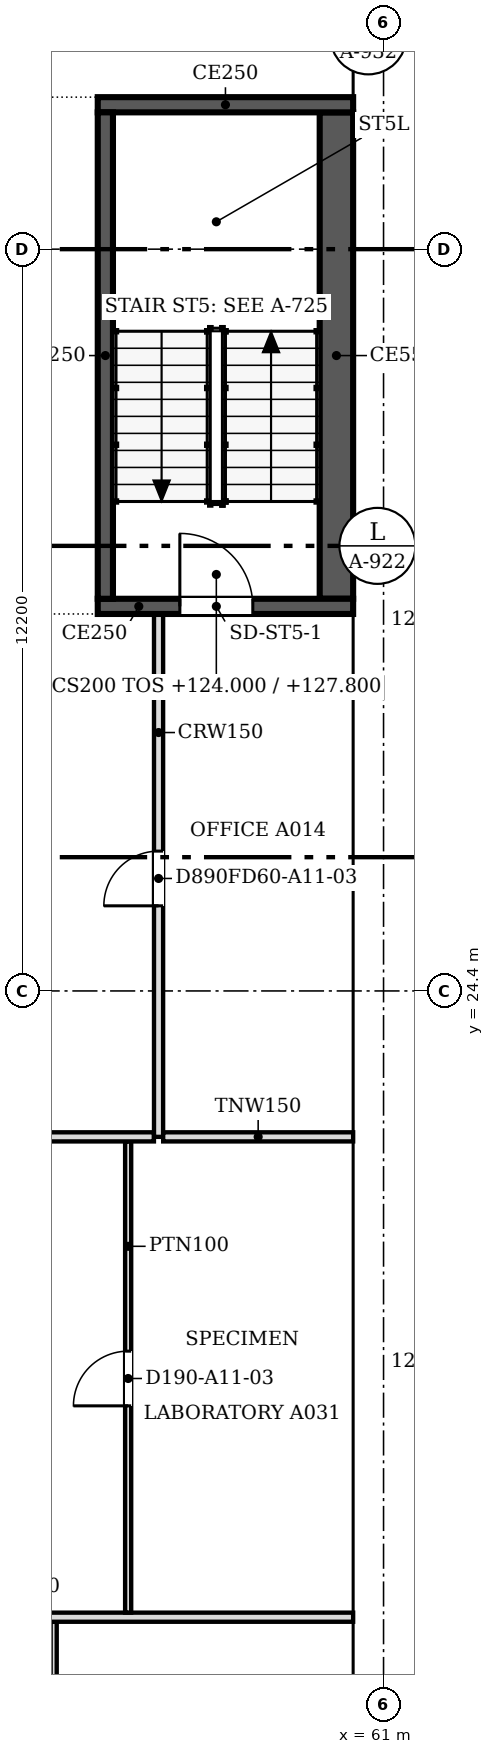
"""IFC4 building model, lengths in metres.
Left out: names, types, materials, properties, quantities, classifications, styles, units other than length and angle.
Written with IfcOpenShell. Run it as: python <this file> out.ifc"""

import sys

from ifc_helpers import new_model, si_unit, direction, frame, frame_2d, origin, place, context, subcontext, project, spatial, polyline, rectangle, outline, extrude, faceted_brep, source, transform, mapped, element, fill, save


model = new_model("IFC4")
c1 = context("Model", 3, precision=1e-05, world=origin(), true_north=direction((0.0, 1.0)))
c2 = subcontext(c1, "Body", "Model", "MODEL_VIEW")
j1 = project(units=[si_unit("LENGTHUNIT", "METRE"), si_unit("PLANEANGLEUNIT", "RADIAN")], contexts=[c1])
p1 = place(None, origin())
s1 = spatial("IfcSite", under=j1, at=p1, CompositionType="ELEMENT")
p2 = place(p1, origin())
s2 = spatial("IfcBuilding", under=s1, at=p2, CompositionType="ELEMENT")
p3 = place(p2, frame((0.0, 0.0, 124.0)))
s3 = spatial("IfcBuildingStorey", under=s2, at=p3, CompositionType="ELEMENT", Elevation=124.0)
m1 = source(origin(), c2, "Body", "SweptSolid", [
    extrude(outline(polyline([(3.05, 0.0), (6.1, 3.8), (3.05, 7.6), (0.0, 3.8), (3.05, 0.0)])), frame((0.0, 0.25, 0.0), z_axis=(0.0, -1.0, 0.0), x_axis=(1.0, 0.0, 0.0)), (0.0, 0.0, 1.0), 0.5),
])
p4 = place(p3, frame((60.75, 9.15, -3.8), z_axis=(0.0, 0.0, 1.0), x_axis=(0.0, 1.0, 0.0)))
e1 = element("IfcWall", 1, at=p4, inside=s3, PredefinedType="SOLIDWALL", context=c2, shape_type="MappedRepresentation", body=[
    mapped(m1, transform((0.0, 0.0, 0.0), scale=1.0)),
])
m2 = source(origin(), c2, "Body", "SweptSolid", [
    extrude(outline(polyline([(3.05, 0.399), (5.78, 3.8), (3.05, 7.201), (0.321, 3.8), (3.05, 0.399)])), frame((0.0, 0.26, 0.0), z_axis=(0.0, -1.0, 0.0), x_axis=(1.0, 0.0, 0.0)), (0.0, 0.0, 1.0), 0.52),
])
p5 = place(p4, origin())
e2 = element("IfcOpeningElement", 2, at=p5, cuts=e1, PredefinedType="OPENING", context=c2, shape_type="MappedRepresentation", body=[
    mapped(m2, transform((0.0, 0.0, 0.0), scale=1.0)),
])
p6 = place(p3, frame((60.75, 15.25, -3.8), z_axis=(0.0, 0.0, 1.0), x_axis=(0.0, 1.0, 0.0)))
e3 = element("IfcWall", 3, at=p6, inside=s3, PredefinedType="SOLIDWALL", context=c2, shape_type="MappedRepresentation", body=[
    mapped(m1, transform((0.0, 0.0, 0.0), scale=1.0)),
])
p7 = place(p6, origin())
e4 = element("IfcOpeningElement", 4, at=p7, cuts=e3, PredefinedType="OPENING", context=c2, shape_type="MappedRepresentation", body=[
    mapped(m2, transform((0.0, 0.0, 0.0), scale=1.0)),
])
m3 = source(origin(), c2, "Body", "Brep", [
    faceted_brep([(3.05, -0.25, 0.0), (6.1, -0.25, 3.8), (6.1, -0.25, 3.8), (3.05, -0.25, 7.6), (0.0, -0.25, 3.8), (0.0, 0.25, 3.8), (3.05, 0.25, 7.6), (6.1, 0.25, 3.8), (6.1, 0.25, 3.8), (3.05, 0.25, 0.0)], [[[0, 1, 2, 3, 4]], [[5, 6, 7, 8, 9]], [[9, 8, 1, 0]], [[7, 6, 3, 2]], [[6, 5, 4, 3]], [[5, 9, 0, 4]], [[1, 8, 7, 2]]]),
])
p8 = place(p3, frame((60.75, 21.35, -3.8), z_axis=(0.0, 0.0, 1.0), x_axis=(0.0, 1.0, 0.0)))
e5 = element("IfcWall", 5, at=p8, inside=s3, PredefinedType="SOLIDWALL", context=c2, shape_type="MappedRepresentation", body=[
    mapped(m3, transform((0.0, 0.0, 0.0), scale=1.0)),
])
p9 = place(p8, origin())
e6 = element("IfcOpeningElement", 6, at=p9, cuts=e5, PredefinedType="OPENING", context=c2, shape_type="MappedRepresentation", body=[
    mapped(m2, transform((0.0, 0.0, 0.0), scale=1.0)),
])
p10 = place(p3, frame((60.75, 27.45, -3.8), z_axis=(0.0, 0.0, 1.0), x_axis=(0.0, 1.0, 0.0)))
e7 = element("IfcWall", 7, at=p10, inside=s3, PredefinedType="SOLIDWALL", context=c2, shape_type="MappedRepresentation", body=[
    mapped(m1, transform((0.0, 0.0, 0.0), scale=1.0)),
])
p11 = place(p10, origin())
e8 = element("IfcOpeningElement", 8, at=p11, cuts=e7, PredefinedType="OPENING", context=c2, shape_type="MappedRepresentation", body=[
    mapped(m2, transform((0.0, 0.0, 0.0), scale=1.0)),
])
p12 = place(p3, frame((60.75, 33.55, -3.8), z_axis=(0.0, 0.0, 1.0), x_axis=(0.0, 1.0, 0.0)))
e9 = element("IfcWall", 9, at=p12, inside=s3, PredefinedType="SOLIDWALL", context=c2, shape_type="MappedRepresentation", body=[
    mapped(m3, transform((0.0, 0.0, 0.0), scale=1.0)),
])
p13 = place(p12, origin())
e10 = element("IfcOpeningElement", 10, at=p13, cuts=e9, PredefinedType="OPENING", context=c2, shape_type="MappedRepresentation", body=[
    mapped(m2, transform((0.0, 0.0, 0.0), scale=1.0)),
])
p14 = place(p3, frame((60.75, 39.65, -3.8), z_axis=(0.0, 0.0, 1.0), x_axis=(0.0, 1.0, 0.0)))
e11 = element("IfcWall", 11, at=p14, inside=s3, PredefinedType="SOLIDWALL", context=c2, shape_type="MappedRepresentation", body=[
    mapped(m1, transform((0.0, 0.0, 0.0), scale=1.0)),
])
p15 = place(p14, origin())
e12 = element("IfcOpeningElement", 12, at=p15, cuts=e11, PredefinedType="OPENING", context=c2, shape_type="MappedRepresentation", body=[
    mapped(m2, transform((0.0, 0.0, 0.0), scale=1.0)),
])
p16 = place(p2, frame((0.0, 0.0, 127.8)))
s4 = spatial("IfcBuildingStorey", under=s2, at=p16, CompositionType="ELEMENT", Elevation=127.8)
p17 = place(p16, frame((60.75, 12.2, -3.8), z_axis=(0.0, 0.0, 1.0), x_axis=(0.0, 1.0, 0.0)))
e13 = element("IfcWall", 13, at=p17, inside=s4, PredefinedType="SOLIDWALL", context=c2, shape_type="MappedRepresentation", body=[
    mapped(m1, transform((0.0, 0.0, 0.0), scale=1.0)),
])
p18 = place(p17, origin())
e14 = element("IfcOpeningElement", 14, at=p18, cuts=e13, PredefinedType="OPENING", context=c2, shape_type="MappedRepresentation", body=[
    mapped(m2, transform((0.0, 0.0, 0.0), scale=1.0)),
])
p19 = place(p16, frame((60.75, 18.3, -3.8), z_axis=(0.0, 0.0, 1.0), x_axis=(0.0, 1.0, 0.0)))
e15 = element("IfcWall", 15, at=p19, inside=s4, PredefinedType="SOLIDWALL", context=c2, shape_type="MappedRepresentation", body=[
    mapped(m3, transform((0.0, 0.0, 0.0), scale=1.0)),
])
p20 = place(p19, origin())
e16 = element("IfcOpeningElement", 16, at=p20, cuts=e15, PredefinedType="OPENING", context=c2, shape_type="MappedRepresentation", body=[
    mapped(m2, transform((0.0, 0.0, 0.0), scale=1.0)),
])
p21 = place(p16, frame((60.75, 24.4, -3.8), z_axis=(0.0, 0.0, 1.0), x_axis=(0.0, 1.0, 0.0)))
e17 = element("IfcWall", 17, at=p21, inside=s4, PredefinedType="SOLIDWALL", context=c2, shape_type="MappedRepresentation", body=[
    mapped(m1, transform((0.0, 0.0, 0.0), scale=1.0)),
])
p22 = place(p21, origin())
e18 = element("IfcOpeningElement", 18, at=p22, cuts=e17, PredefinedType="OPENING", context=c2, shape_type="MappedRepresentation", body=[
    mapped(m2, transform((0.0, 0.0, 0.0), scale=1.0)),
])
p23 = place(p16, frame((60.75, 30.5, -3.8), z_axis=(0.0, 0.0, 1.0), x_axis=(0.0, 1.0, 0.0)))
e19 = element("IfcWall", 19, at=p23, inside=s4, PredefinedType="SOLIDWALL", context=c2, shape_type="MappedRepresentation", body=[
    mapped(m1, transform((0.0, 0.0, 0.0), scale=1.0)),
])
p24 = place(p23, origin())
e20 = element("IfcOpeningElement", 20, at=p24, cuts=e19, PredefinedType="OPENING", context=c2, shape_type="MappedRepresentation", body=[
    mapped(m2, transform((0.0, 0.0, 0.0), scale=1.0)),
])
p25 = place(p16, frame((60.75, 36.6, -3.8), z_axis=(0.0, 0.0, 1.0), x_axis=(0.0, 1.0, 0.0)))
e21 = element("IfcWall", 21, at=p25, inside=s4, PredefinedType="SOLIDWALL", context=c2, shape_type="MappedRepresentation", body=[
    mapped(m3, transform((0.0, 0.0, 0.0), scale=1.0)),
])
p26 = place(p25, origin())
e22 = element("IfcOpeningElement", 22, at=p26, cuts=e21, PredefinedType="OPENING", context=c2, shape_type="MappedRepresentation", body=[
    mapped(m2, transform((0.0, 0.0, 0.0), scale=1.0)),
])
p27 = place(p3, frame((60.5, 30.725, 0.0), z_axis=(0.0, 0.0, 1.0), x_axis=(-1.0, 0.0, 0.0)))
e23 = element("IfcWall", 23, at=p27, inside=s3, PredefinedType="SOLIDWALL", context=c2, shape_type="SweptSolid", body=[
    extrude(rectangle(XDim=4.2, YDim=0.25, at=frame_2d((2.1, 0.0))), origin(), (0.0, 0.0, 1.0), 3.8),
])
m4 = source(origin(), c2, "Body", "SweptSolid", [
    extrude(rectangle(XDim=1.2, YDim=2.1, at=frame_2d((0.6, 1.05))), frame((0.0, 0.135, 0.0), z_axis=(0.0, -1.0, 0.0), x_axis=(1.0, 0.0, 0.0)), (0.0, 0.0, 1.0), 0.27),
])
p28 = place(p27, frame((1.65, 0.0, 0.0)))
e24 = element("IfcOpeningElement", 24, at=p28, cuts=e23, PredefinedType="OPENING", context=c2, shape_type="MappedRepresentation", body=[
    mapped(m4, transform((0.0, 0.0, 0.0), scale=1.0)),
])
p29 = place(p3, frame((56.425, 30.85, 0.0), z_axis=(0.0, 0.0, 1.0), x_axis=(0.0, 1.0, 0.0)))
e25 = element("IfcWall", 25, at=p29, inside=s3, PredefinedType="SOLIDWALL", context=c2, shape_type="SweptSolid", body=[
    extrude(rectangle(XDim=8.0, YDim=0.25, at=frame_2d((4.0, 0.0))), origin(), (0.0, 0.0, 1.0), 3.8),
])
p30 = place(p3, frame((56.3, 38.975, 0.0), z_axis=(0.0, 0.0, 1.0), x_axis=(1.0, 0.0, 0.0)))
e26 = element("IfcWall", 26, at=p30, inside=s3, PredefinedType="SOLIDWALL", context=c2, shape_type="SweptSolid", body=[
    extrude(rectangle(XDim=4.2, YDim=0.25, at=frame_2d((2.1, 0.0))), origin(), (0.0, 0.0, 1.0), 3.8),
])
p31 = place(p3, frame((60.225, 38.85, 0.0), z_axis=(0.0, 0.0, 1.0), x_axis=(0.0, -1.0, 0.0)))
e27 = element("IfcWall", 27, at=p31, inside=s3, PredefinedType="SOLIDWALL", context=c2, shape_type="SweptSolid", body=[
    extrude(rectangle(XDim=8.0, YDim=0.55, at=frame_2d((4.0, 0.0))), origin(), (0.0, 0.0, 1.0), 3.8),
])
p32 = place(p3, frame((55.575, 14.024, 0.0), z_axis=(0.0, 0.0, 1.0), x_axis=(0.0, -1.0, 0.0)))
e28 = element("IfcWall", 28, at=p32, inside=s3, PredefinedType="PARTITIONING", context=c2, shape_type="SweptSolid", body=[
    extrude(rectangle(XDim=5.924, YDim=0.1, at=frame_2d((2.962, 0.0))), origin(), (0.0, 0.0, 1.0), 3.067),
])
m5 = source(origin(), c2, "Body", "SweptSolid", [
    extrude(rectangle(XDim=0.9, YDim=2.1, at=frame_2d((0.45, 1.05))), frame((0.0, 0.06, 0.0), z_axis=(0.0, -1.0, 0.0), x_axis=(1.0, 0.0, 0.0)), (0.0, 0.0, 1.0), 0.12),
])
p33 = place(p32, frame((2.524, 0.0, 0.0)))
e29 = element("IfcOpeningElement", 29, at=p33, cuts=e28, PredefinedType="OPENING", context=c2, shape_type="MappedRepresentation", body=[
    mapped(m5, transform((0.0, 0.0, 0.0), scale=1.0)),
])
p34 = place(p3, frame((49.426, 14.1, 0.0), z_axis=(0.0, 0.0, 1.0), x_axis=(1.0, 0.0, 0.0)))
e30 = element("IfcWall", 30, at=p34, inside=s3, PredefinedType="PARTITIONING", context=c2, shape_type="SweptSolid", body=[
    extrude(rectangle(XDim=11.074, YDim=0.15, at=frame_2d((5.537, 0.0))), origin(), (0.0, 0.0, 1.0), 3.067),
])
p35 = place(p3, frame((56.8, 21.924, 0.0), z_axis=(0.0, 0.0, 1.0), x_axis=(0.0, -1.0, 0.0)))
e31 = element("IfcWall", 31, at=p35, inside=s3, PredefinedType="PARTITIONING", context=c2, shape_type="SweptSolid", body=[
    extrude(rectangle(XDim=7.748, YDim=0.1, at=frame_2d((3.874, 0.0))), origin(), (0.0, 0.0, 1.0), 3.067),
])
p36 = place(p35, frame((3.448, 0.0, 0.0)))
e32 = element("IfcOpeningElement", 32, at=p36, cuts=e31, PredefinedType="OPENING", context=c2, shape_type="MappedRepresentation", body=[
    mapped(m5, transform((0.0, 0.0, 0.0), scale=1.0)),
])
p37 = place(p3, frame((45.476, 22.0, 0.0), z_axis=(0.0, 0.0, 1.0), x_axis=(1.0, 0.0, 0.0)))
e33 = element("IfcWall", 33, at=p37, inside=s3, PredefinedType="PARTITIONING", context=c2, shape_type="SweptSolid", body=[
    extrude(rectangle(XDim=11.748, YDim=0.15, at=frame_2d((5.874, 0.0))), origin(), (0.0, 0.0, 1.0), 3.067),
])
p38 = place(p3, frame((57.3, 30.6, 0.0), z_axis=(0.0, 0.0, 1.0), x_axis=(0.0, -1.0, 0.0)))
e34 = element("IfcWall", 34, at=p38, inside=s3, PredefinedType="PARTITIONING", context=c2, shape_type="SweptSolid", body=[
    extrude(rectangle(XDim=8.6, YDim=0.15, at=frame_2d((4.3, 0.0))), origin(), (0.0, 0.0, 1.0), 3.067),
])
m6 = source(origin(), c2, "Body", "SweptSolid", [
    extrude(rectangle(XDim=0.9, YDim=2.1, at=frame_2d((0.45, 1.05))), frame((0.0, 0.085, 0.0), z_axis=(0.0, -1.0, 0.0), x_axis=(1.0, 0.0, 0.0)), (0.0, 0.0, 1.0), 0.17),
])
p39 = place(p38, frame((3.9, 0.0, 0.0)))
e35 = element("IfcOpeningElement", 35, at=p39, cuts=e34, PredefinedType="OPENING", context=c2, shape_type="MappedRepresentation", body=[
    mapped(m6, transform((0.0, 0.0, 0.0), scale=1.0)),
])
p40 = place(p3, frame((57.376, 22.0, 0.0), z_axis=(0.0, 0.0, 1.0), x_axis=(1.0, 0.0, 0.0)))
e36 = element("IfcWall", 36, at=p40, inside=s3, PredefinedType="PARTITIONING", context=c2, shape_type="SweptSolid", body=[
    extrude(rectangle(XDim=3.124, YDim=0.15, at=frame_2d((1.562, 0.0))), origin(), (0.0, 0.0, 1.0), 3.067),
])
m7 = source(origin(), c2, "Body", "SweptSolid", [
    extrude(rectangle(XDim=1.2, YDim=2.1, at=frame_2d((0.6, 1.05))), frame((0.0, 0.025, 0.0), z_axis=(0.0, -1.0, 0.0), x_axis=(1.0, 0.0, 0.0)), (0.0, 0.0, 1.0), 0.05),
])
p41 = place(p28, origin())
e37 = element("IfcDoor", 37, at=p41, inside=s3, OperationType="SINGLE_SWING_RIGHT", PredefinedType="DOOR", context=c2, shape_type="MappedRepresentation", body=[
    mapped(m7, transform((0.0, 0.0, 0.0), scale=1.0)),
])
fill(e24, e37)
m8 = source(origin(), c2, "Body", "SweptSolid", [
    extrude(rectangle(XDim=0.9, YDim=2.1, at=frame_2d((0.45, 1.05))), frame((0.0, 0.025, 0.0), z_axis=(0.0, -1.0, 0.0), x_axis=(1.0, 0.0, 0.0)), (0.0, 0.0, 1.0), 0.05),
])
p42 = place(p36, origin())
e38 = element("IfcDoor", 38, at=p42, inside=s3, OperationType="SINGLE_SWING_RIGHT", PredefinedType="DOOR", context=c2, shape_type="MappedRepresentation", body=[
    mapped(m8, transform((0.0, 0.0, 0.0), scale=1.0)),
])
fill(e32, e38)
p43 = place(p39, origin())
e39 = element("IfcDoor", 39, at=p43, inside=s3, OperationType="SINGLE_SWING_RIGHT", PredefinedType="DOOR", context=c2, shape_type="MappedRepresentation", body=[
    mapped(m8, transform((0.0, 0.0, 0.0), scale=1.0)),
])
fill(e35, e39)
save(model, sys.argv[1])
